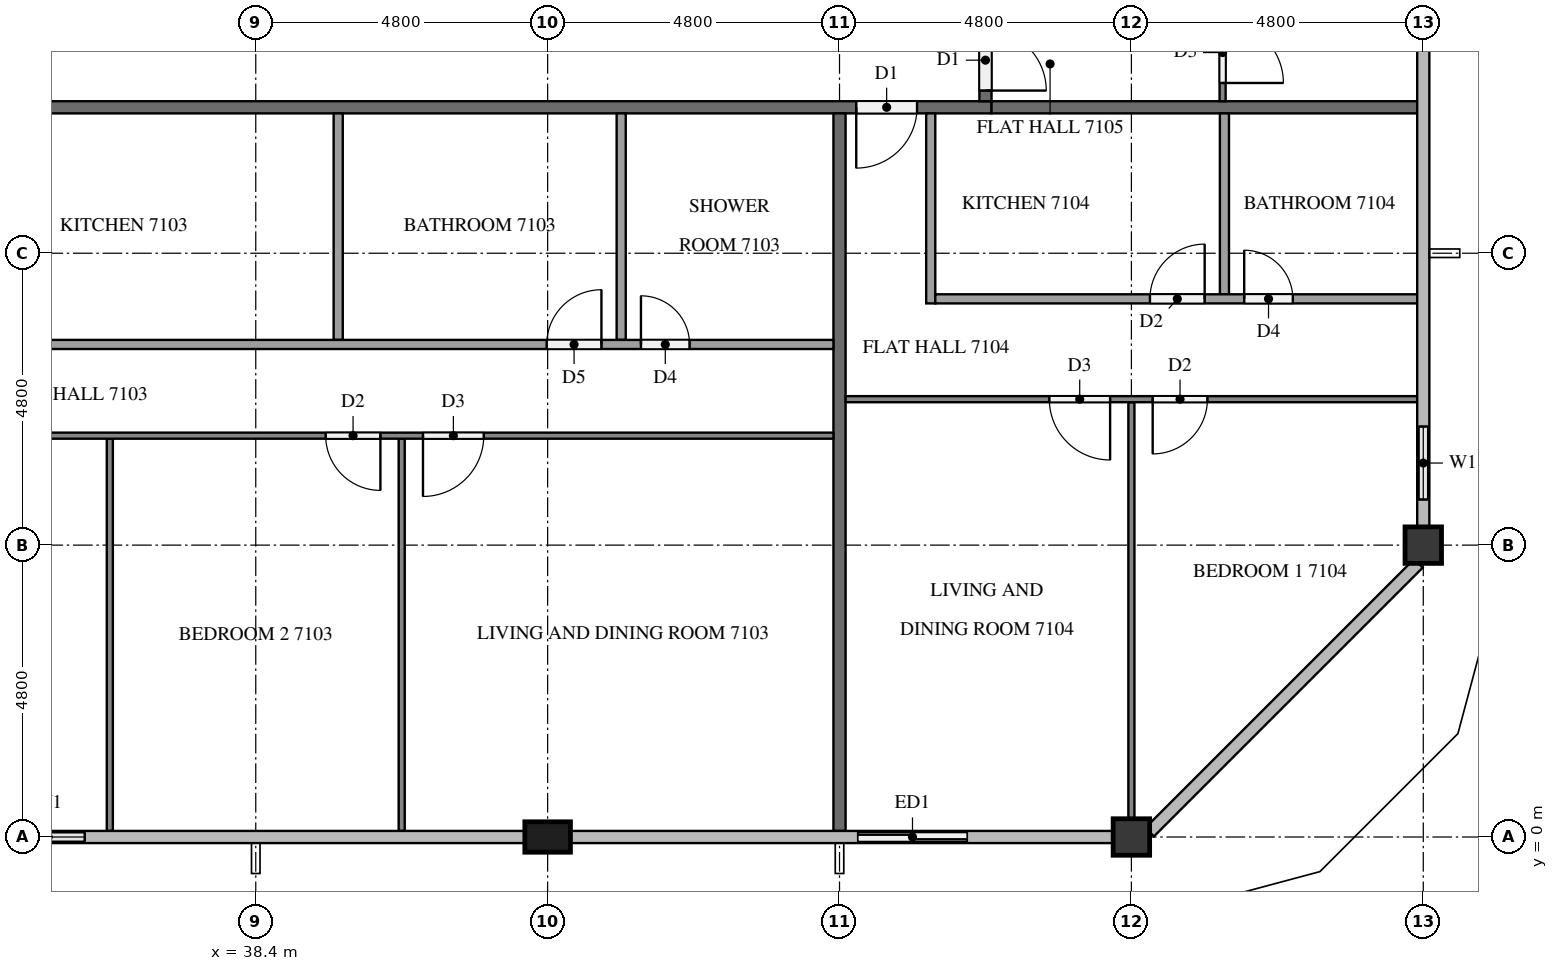
"""IFC4 building model, lengths in metres.
Left out: names, types, materials, properties, quantities, classifications, styles, units other than length and angle.
Written with IfcOpenShell. Run it as: python <this file> out.ifc"""

import sys

from ifc_helpers import new_model, si_unit, direction, frame, frame_2d, origin, origin_2d, place, context, subcontext, project, spatial, rectangle, extrude, element, fill, save


model = new_model("IFC4")
c1 = context("Model", 3, precision=1e-05, world=origin(), true_north=direction((0.0, 1.0)))
c2 = subcontext(c1, "Body", "Model", "MODEL_VIEW")
j1 = project(units=[si_unit("LENGTHUNIT", "METRE"), si_unit("PLANEANGLEUNIT", "RADIAN")], contexts=[c1])
p1 = place(None, origin())
s1 = spatial("IfcSite", under=j1, at=p1, CompositionType="ELEMENT")
p2 = place(p1, origin())
s2 = spatial("IfcBuilding", under=s1, at=p2, CompositionType="ELEMENT")
p3 = place(p2, frame((0.0, 0.0, 272.1)))
s3 = spatial("IfcBuildingStorey", under=s2, at=p3, CompositionType="ELEMENT", Elevation=272.1)
p4 = place(p3, frame((43.2, 0.0, 0.0), z_axis=(0.0, 0.0, 1.0), x_axis=(1.0, 0.0, 0.0)))
e1 = element("IfcColumn", 1, at=p4, inside=s3, PredefinedType="COLUMN", context=c2, shape_type="SweptSolid", body=[
    extrude(rectangle(XDim=0.75, YDim=0.5, at=origin_2d()), origin(), (0.0, 0.0, 1.0), 3.2),
])
for number, where, z_axis, x_axis in (
    (2, (52.8, 0.0, 0.0), (0.0, 0.0, 1.0), (1.0, 0.0, 0.0)),
    (3, (57.6, 4.8, 0.0), (0.0, 0.0, 1.0), (1.0, 0.0, 0.0)),
):
    element("IfcColumn", number, at=place(p3, frame(where, z_axis=z_axis, x_axis=x_axis)), inside=s3, PredefinedType="COLUMN", context=c2, shape_type="SweptSolid", body=[
        extrude(rectangle(XDim=0.6, YDim=0.6, at=origin_2d()), origin(), (0.0, 0.0, 1.0), 3.2),
    ])
p5 = place(p3, frame((33.975, 0.0, 0.0), z_axis=(0.0, 0.0, 1.0), x_axis=(1.0, 0.0, 0.0)))
e4 = element("IfcWall", 4, at=p5, inside=s3, PredefinedType="SOLIDWALL", context=c2, shape_type="SweptSolid", body=[
    extrude(rectangle(XDim=2.025, YDim=0.15, at=frame_2d((1.012, 0.0))), origin(), (0.0, 0.0, 1.0), 3.2),
])
p6 = place(p5, frame((0.413, 0.0, 0.9)))
e5 = element("IfcOpeningElement", 5, at=p6, cuts=e4, PredefinedType="OPENING", context=c2, shape_type="SweptSolid", body=[
    extrude(rectangle(XDim=1.2, YDim=1.4, at=frame_2d((0.6, 0.7))), frame((0.0, 0.085, 0.0), z_axis=(0.0, -1.0, 0.0), x_axis=(1.0, 0.0, 0.0)), (0.0, 0.0, 1.0), 0.17),
])
p7 = place(p3, frame((48.0, 0.0, 0.0), z_axis=(0.0, 0.0, 1.0), x_axis=(1.0, 0.0, 0.0)))
e6 = element("IfcWall", 6, at=p7, inside=s3, PredefinedType="SOLIDWALL", context=c2, shape_type="SweptSolid", body=[
    extrude(rectangle(XDim=2.4, YDim=0.15, at=frame_2d((1.2, 0.0))), origin(), (0.0, 0.0, 1.0), 3.2),
])
p8 = place(p7, frame((0.3, 0.0, 0.0)))
e7 = element("IfcOpeningElement", 7, at=p8, cuts=e6, PredefinedType="OPENING", context=c2, shape_type="SweptSolid", body=[
    extrude(rectangle(XDim=1.8, YDim=2.4, at=frame_2d((0.9, 1.2))), frame((0.0, 0.085, 0.0), z_axis=(0.0, -1.0, 0.0), x_axis=(1.0, 0.0, 0.0)), (0.0, 0.0, 1.0), 0.17),
])
p9 = place(p3, frame((57.6, 5.1, 0.0), z_axis=(0.0, 0.0, 1.0), x_axis=(0.0, 1.0, 0.0)))
e8 = element("IfcWall", 8, at=p9, inside=s3, PredefinedType="SOLIDWALL", context=c2, shape_type="SweptSolid", body=[
    extrude(rectangle(XDim=2.1, YDim=0.15, at=frame_2d((1.05, 0.0))), origin(), (0.0, 0.0, 1.0), 3.2),
])
p10 = place(p9, frame((0.45, 0.0, 0.9)))
e9 = element("IfcOpeningElement", 9, at=p10, cuts=e8, PredefinedType="OPENING", context=c2, shape_type="SweptSolid", body=[
    extrude(rectangle(XDim=1.2, YDim=1.4, at=frame_2d((0.6, 0.7))), frame((0.0, 0.085, 0.0), z_axis=(0.0, -1.0, 0.0), x_axis=(1.0, 0.0, 0.0)), (0.0, 0.0, 1.0), 0.17),
])
p11 = place(p3, frame((50.5, 12.0, 0.0), z_axis=(0.0, 0.0, 1.0), x_axis=(-1.0, 0.0, 0.0)))
e10 = element("IfcWall", 10, at=p11, inside=s3, PredefinedType="PARTITIONING", context=c2, shape_type="SweptSolid", body=[
    extrude(rectangle(XDim=38.6, YDim=0.2, at=frame_2d((19.3, 0.0))), origin(), (0.0, 0.0, 1.0), 3.2),
])
p12 = place(p11, frame((31.525, 0.0, 0.0)))
e11 = element("IfcOpeningElement", 11, at=p12, cuts=e10, PredefinedType="OPENING", context=c2, shape_type="SweptSolid", body=[
    extrude(rectangle(XDim=1.1, YDim=2.1, at=frame_2d((0.55, 1.05))), frame((0.0, 0.11, 0.0), z_axis=(0.0, -1.0, 0.0), x_axis=(1.0, 0.0, 0.0)), (0.0, 0.0, 1.0), 0.22),
])
p13 = place(p11, frame((19.575, 0.0, 0.0)))
e12 = element("IfcOpeningElement", 12, at=p13, cuts=e10, PredefinedType="OPENING", context=c2, shape_type="SweptSolid", body=[
    extrude(rectangle(XDim=1.0, YDim=2.1, at=frame_2d((0.5, 1.05))), frame((0.0, 0.11, 0.0), z_axis=(0.0, -1.0, 0.0), x_axis=(1.0, 0.0, 0.0)), (0.0, 0.0, 1.0), 0.22),
])
p14 = place(p11, frame((18.025, 0.0, 0.0)))
e13 = element("IfcOpeningElement", 13, at=p14, cuts=e10, PredefinedType="OPENING", context=c2, shape_type="SweptSolid", body=[
    extrude(rectangle(XDim=1.0, YDim=2.1, at=frame_2d((0.5, 1.05))), frame((0.0, 0.11, 0.0), z_axis=(0.0, -1.0, 0.0), x_axis=(1.0, 0.0, 0.0)), (0.0, 0.0, 1.0), 0.22),
])
p15 = place(p11, frame((1.225, 0.0, 0.0)))
e14 = element("IfcOpeningElement", 14, at=p15, cuts=e10, PredefinedType="OPENING", context=c2, shape_type="SweptSolid", body=[
    extrude(rectangle(XDim=1.0, YDim=2.1, at=frame_2d((0.5, 1.05))), frame((0.0, 0.11, 0.0), z_axis=(0.0, -1.0, 0.0), x_axis=(1.0, 0.0, 0.0)), (0.0, 0.0, 1.0), 0.22),
])
p16 = place(p3, frame((50.4, 40.7, 0.0), z_axis=(0.0, 0.0, 1.0), x_axis=(0.0, -1.0, 0.0)))
e15 = element("IfcWall", 15, at=p16, inside=s3, PredefinedType="PARTITIONING", context=c2, shape_type="SweptSolid", body=[
    extrude(rectangle(XDim=28.6, YDim=0.2, at=frame_2d((14.3, 0.0))), origin(), (0.0, 0.0, 1.0), 3.2),
])
p17 = place(p16, frame((27.425, 0.0, 0.0)))
e16 = element("IfcOpeningElement", 16, at=p17, cuts=e15, PredefinedType="OPENING", context=c2, shape_type="SweptSolid", body=[
    extrude(rectangle(XDim=1.0, YDim=2.1, at=frame_2d((0.5, 1.05))), frame((0.0, 0.11, 0.0), z_axis=(0.0, -1.0, 0.0), x_axis=(1.0, 0.0, 0.0)), (0.0, 0.0, 1.0), 0.22),
])
p18 = place(p16, frame((0.175, 0.0, 0.0)))
e17 = element("IfcOpeningElement", 17, at=p18, cuts=e15, PredefinedType="OPENING", context=c2, shape_type="SweptSolid", body=[
    extrude(rectangle(XDim=1.0, YDim=2.1, at=frame_2d((0.5, 1.05))), frame((0.0, 0.11, 0.0), z_axis=(0.0, -1.0, 0.0), x_axis=(1.0, 0.0, 0.0)), (0.0, 0.0, 1.0), 0.22),
])
p19 = place(p3, frame((48.0, 11.9, 0.0), z_axis=(0.0, 0.0, 1.0), x_axis=(0.0, -1.0, 0.0)))
e18 = element("IfcWall", 18, at=p19, inside=s3, PredefinedType="PARTITIONING", context=c2, shape_type="SweptSolid", body=[
    extrude(rectangle(XDim=11.8, YDim=0.2, at=frame_2d((5.9, 0.0))), origin(), (0.0, 0.0, 1.0), 3.2),
])
p20 = place(p3, frame((50.5, 12.0, 0.0), z_axis=(0.0, 0.0, 1.0), x_axis=(1.0, 0.0, 0.0)))
e19 = element("IfcWall", 19, at=p20, inside=s3, PredefinedType="PARTITIONING", context=c2, shape_type="SweptSolid", body=[
    extrude(rectangle(XDim=7.0, YDim=0.2, at=frame_2d((3.5, 0.0))), origin(), (0.0, 0.0, 1.0), 3.2),
])
for number, where, z_axis, x_axis in (
    (20, (36.0, 6.55, 0.0), (0.0, 0.0, 1.0), (0.0, -1.0, 0.0)),
    (21, (40.8, 6.55, 0.0), (0.0, 0.0, 1.0), (0.0, -1.0, 0.0)),
):
    element("IfcWall", number, at=place(p3, frame(where, z_axis=z_axis, x_axis=x_axis)), inside=s3, PredefinedType="PARTITIONING", context=c2, shape_type="SweptSolid", body=[
        extrude(rectangle(XDim=6.45, YDim=0.1, at=frame_2d((3.225, 0.0))), origin(), (0.0, 0.0, 1.0), 3.2),
    ])
p21 = place(p3, frame((47.9, 6.6, 0.0), z_axis=(0.0, 0.0, 1.0), x_axis=(-1.0, 0.0, 0.0)))
e22 = element("IfcWall", 22, at=p21, inside=s3, PredefinedType="PARTITIONING", context=c2, shape_type="SweptSolid", body=[
    extrude(rectangle(XDim=16.6, YDim=0.1, at=frame_2d((8.3, 0.0))), origin(), (0.0, 0.0, 1.0), 3.2),
])
p22 = place(p21, frame((15.4, 0.0, 0.0)))
e23 = element("IfcOpeningElement", 23, at=p22, cuts=e22, PredefinedType="OPENING", context=c2, shape_type="SweptSolid", body=[
    extrude(rectangle(XDim=0.9, YDim=2.1, at=frame_2d((0.45, 1.05))), frame((0.0, 0.06, 0.0), z_axis=(0.0, -1.0, 0.0), x_axis=(1.0, 0.0, 0.0)), (0.0, 0.0, 1.0), 0.12),
])
p23 = place(p21, frame((7.45, 0.0, 0.0)))
e24 = element("IfcOpeningElement", 24, at=p23, cuts=e22, PredefinedType="OPENING", context=c2, shape_type="SweptSolid", body=[
    extrude(rectangle(XDim=0.9, YDim=2.1, at=frame_2d((0.45, 1.05))), frame((0.0, 0.06, 0.0), z_axis=(0.0, -1.0, 0.0), x_axis=(1.0, 0.0, 0.0)), (0.0, 0.0, 1.0), 0.12),
])
p24 = place(p21, frame((5.75, 0.0, 0.0)))
e25 = element("IfcOpeningElement", 25, at=p24, cuts=e22, PredefinedType="OPENING", context=c2, shape_type="SweptSolid", body=[
    extrude(rectangle(XDim=1.0, YDim=2.1, at=frame_2d((0.5, 1.05))), frame((0.0, 0.06, 0.0), z_axis=(0.0, -1.0, 0.0), x_axis=(1.0, 0.0, 0.0)), (0.0, 0.0, 1.0), 0.12),
])
for number, where, z_axis, x_axis in (
    (26, (39.756, 11.9, 0.0), (0.0, 0.0, 1.0), (0.0, -1.0, 0.0)),
    (27, (44.41, 11.9, 0.0), (0.0, 0.0, 1.0), (0.0, -1.0, 0.0)),
):
    element("IfcWall", number, at=place(p3, frame(where, z_axis=z_axis, x_axis=x_axis)), inside=s3, PredefinedType="PARTITIONING", context=c2, shape_type="SweptSolid", body=[
        extrude(rectangle(XDim=3.725, YDim=0.15, at=frame_2d((1.862, 0.0))), origin(), (0.0, 0.0, 1.0), 3.2),
    ])
p25 = place(p3, frame((32.775, 8.1, 0.0), z_axis=(0.0, 0.0, 1.0), x_axis=(1.0, 0.0, 0.0)))
e28 = element("IfcWall", 28, at=p25, inside=s3, PredefinedType="PARTITIONING", context=c2, shape_type="SweptSolid", body=[
    extrude(rectangle(XDim=15.125, YDim=0.15, at=frame_2d((7.562, 0.0))), origin(), (0.0, 0.0, 1.0), 3.2),
])
p26 = place(p25, frame((0.3, 0.0, 0.0)))
e29 = element("IfcOpeningElement", 29, at=p26, cuts=e28, PredefinedType="OPENING", context=c2, shape_type="SweptSolid", body=[
    extrude(rectangle(XDim=0.9, YDim=2.1, at=frame_2d((0.45, 1.05))), frame((0.0, 0.085, 0.0), z_axis=(0.0, -1.0, 0.0), x_axis=(1.0, 0.0, 0.0)), (0.0, 0.0, 1.0), 0.17),
])
p27 = place(p25, frame((10.41, 0.0, 0.0)))
e30 = element("IfcOpeningElement", 30, at=p27, cuts=e28, PredefinedType="OPENING", context=c2, shape_type="SweptSolid", body=[
    extrude(rectangle(XDim=0.9, YDim=2.1, at=frame_2d((0.45, 1.05))), frame((0.0, 0.085, 0.0), z_axis=(0.0, -1.0, 0.0), x_axis=(1.0, 0.0, 0.0)), (0.0, 0.0, 1.0), 0.17),
])
p28 = place(p25, frame((11.96, 0.0, 0.0)))
e31 = element("IfcOpeningElement", 31, at=p28, cuts=e28, PredefinedType="OPENING", context=c2, shape_type="SweptSolid", body=[
    extrude(rectangle(XDim=0.8, YDim=2.1, at=frame_2d((0.4, 1.05))), frame((0.0, 0.085, 0.0), z_axis=(0.0, -1.0, 0.0), x_axis=(1.0, 0.0, 0.0)), (0.0, 0.0, 1.0), 0.17),
])
p29 = place(p3, frame((52.8, 7.15, 0.0), z_axis=(0.0, 0.0, 1.0), x_axis=(0.0, -1.0, 0.0)))
e32 = element("IfcWall", 32, at=p29, inside=s3, PredefinedType="PARTITIONING", context=c2, shape_type="SweptSolid", body=[
    extrude(rectangle(XDim=6.85, YDim=0.1, at=frame_2d((3.425, 0.0))), origin(), (0.0, 0.0, 1.0), 3.2),
])
p30 = place(p3, frame((57.5, 7.2, 0.0), z_axis=(0.0, 0.0, 1.0), x_axis=(-1.0, 0.0, 0.0)))
e33 = element("IfcWall", 33, at=p30, inside=s3, PredefinedType="PARTITIONING", context=c2, shape_type="SweptSolid", body=[
    extrude(rectangle(XDim=9.4, YDim=0.1, at=frame_2d((4.7, 0.0))), origin(), (0.0, 0.0, 1.0), 3.2),
])
p31 = place(p30, frame((5.05, 0.0, 0.0)))
e34 = element("IfcOpeningElement", 34, at=p31, cuts=e33, PredefinedType="OPENING", context=c2, shape_type="SweptSolid", body=[
    extrude(rectangle(XDim=1.0, YDim=2.1, at=frame_2d((0.5, 1.05))), frame((0.0, 0.06, 0.0), z_axis=(0.0, -1.0, 0.0), x_axis=(1.0, 0.0, 0.0)), (0.0, 0.0, 1.0), 0.12),
])
p32 = place(p30, frame((3.45, 0.0, 0.0)))
e35 = element("IfcOpeningElement", 35, at=p32, cuts=e33, PredefinedType="OPENING", context=c2, shape_type="SweptSolid", body=[
    extrude(rectangle(XDim=0.9, YDim=2.1, at=frame_2d((0.45, 1.05))), frame((0.0, 0.06, 0.0), z_axis=(0.0, -1.0, 0.0), x_axis=(1.0, 0.0, 0.0)), (0.0, 0.0, 1.0), 0.12),
])
p33 = place(p3, frame((54.33, 11.9, 0.0), z_axis=(0.0, 0.0, 1.0), x_axis=(0.0, -1.0, 0.0)))
e36 = element("IfcWall", 36, at=p33, inside=s3, PredefinedType="PARTITIONING", context=c2, shape_type="SweptSolid", body=[
    extrude(rectangle(XDim=2.975, YDim=0.15, at=frame_2d((1.487, 0.0))), origin(), (0.0, 0.0, 1.0), 3.2),
])
p34 = place(p3, frame((49.5, 11.9, 0.0), z_axis=(0.0, 0.0, 1.0), x_axis=(0.0, -1.0, 0.0)))
e37 = element("IfcWall", 37, at=p34, inside=s3, PredefinedType="PARTITIONING", context=c2, shape_type="SweptSolid", body=[
    extrude(rectangle(XDim=3.125, YDim=0.15, at=frame_2d((1.562, 0.0))), origin(), (0.0, 0.0, 1.0), 3.2),
])
p35 = place(p3, frame((49.575, 8.85, 0.0), z_axis=(0.0, 0.0, 1.0), x_axis=(1.0, 0.0, 0.0)))
e38 = element("IfcWall", 38, at=p35, inside=s3, PredefinedType="PARTITIONING", context=c2, shape_type="SweptSolid", body=[
    extrude(rectangle(XDim=7.925, YDim=0.15, at=frame_2d((3.962, 0.0))), origin(), (0.0, 0.0, 1.0), 3.2),
])
p36 = place(p35, frame((3.53, 0.0, 0.0)))
e39 = element("IfcOpeningElement", 39, at=p36, cuts=e38, PredefinedType="OPENING", context=c2, shape_type="SweptSolid", body=[
    extrude(rectangle(XDim=0.9, YDim=2.1, at=frame_2d((0.45, 1.05))), frame((0.0, 0.085, 0.0), z_axis=(0.0, -1.0, 0.0), x_axis=(1.0, 0.0, 0.0)), (0.0, 0.0, 1.0), 0.17),
])
p37 = place(p35, frame((5.08, 0.0, 0.0)))
e40 = element("IfcOpeningElement", 40, at=p37, cuts=e38, PredefinedType="OPENING", context=c2, shape_type="SweptSolid", body=[
    extrude(rectangle(XDim=0.8, YDim=2.1, at=frame_2d((0.4, 1.05))), frame((0.0, 0.085, 0.0), z_axis=(0.0, -1.0, 0.0), x_axis=(1.0, 0.0, 0.0)), (0.0, 0.0, 1.0), 0.17),
])
p38 = place(p3, frame((54.3, 28.7, 0.0), z_axis=(0.0, 0.0, 1.0), x_axis=(0.0, -1.0, 0.0)))
e41 = element("IfcWall", 41, at=p38, inside=s3, PredefinedType="PARTITIONING", context=c2, shape_type="SweptSolid", body=[
    extrude(rectangle(XDim=16.6, YDim=0.1, at=frame_2d((8.3, 0.0))), origin(), (0.0, 0.0, 1.0), 3.2),
])
p39 = place(p38, frame((15.3, 0.0, 0.0)))
e42 = element("IfcOpeningElement", 42, at=p39, cuts=e41, PredefinedType="OPENING", context=c2, shape_type="SweptSolid", body=[
    extrude(rectangle(XDim=1.0, YDim=2.1, at=frame_2d((0.5, 1.05))), frame((0.0, 0.06, 0.0), z_axis=(0.0, -1.0, 0.0), x_axis=(1.0, 0.0, 0.0)), (0.0, 0.0, 1.0), 0.12),
])
p40 = place(p38, frame((5.05, 0.0, 0.0)))
e43 = element("IfcOpeningElement", 43, at=p40, cuts=e41, PredefinedType="OPENING", context=c2, shape_type="SweptSolid", body=[
    extrude(rectangle(XDim=0.9, YDim=2.1, at=frame_2d((0.45, 1.05))), frame((0.0, 0.06, 0.0), z_axis=(0.0, -1.0, 0.0), x_axis=(1.0, 0.0, 0.0)), (0.0, 0.0, 1.0), 0.12),
])
p41 = place(p38, frame((3.45, 0.0, 0.0)))
e44 = element("IfcOpeningElement", 44, at=p41, cuts=e41, PredefinedType="OPENING", context=c2, shape_type="SweptSolid", body=[
    extrude(rectangle(XDim=0.9, YDim=2.1, at=frame_2d((0.45, 1.05))), frame((0.0, 0.06, 0.0), z_axis=(0.0, -1.0, 0.0), x_axis=(1.0, 0.0, 0.0)), (0.0, 0.0, 1.0), 0.12),
])
p42 = place(p6, origin())
e45 = element("IfcWindow", 45, at=p42, inside=s3, PartitioningType="SINGLE_PANEL", PredefinedType="WINDOW", context=c2, shape_type="SweptSolid", body=[
    extrude(rectangle(XDim=1.2, YDim=1.4, at=frame_2d((0.6, 0.7))), frame((0.0, 0.03, 0.0), z_axis=(0.0, -1.0, 0.0), x_axis=(1.0, 0.0, 0.0)), (0.0, 0.0, 1.0), 0.06),
])
fill(e5, e45)
p43 = place(p8, origin())
e46 = element("IfcDoor", 46, at=p43, inside=s3, OperationType="SLIDING_TO_RIGHT", PredefinedType="DOOR", context=c2, shape_type="SweptSolid", body=[
    extrude(rectangle(XDim=1.8, YDim=2.4, at=frame_2d((0.9, 1.2))), frame((0.0, 0.025, 0.0), z_axis=(0.0, -1.0, 0.0), x_axis=(1.0, 0.0, 0.0)), (0.0, 0.0, 1.0), 0.05),
])
fill(e7, e46)
p44 = place(p10, origin())
e47 = element("IfcWindow", 47, at=p44, inside=s3, PartitioningType="SINGLE_PANEL", PredefinedType="WINDOW", context=c2, shape_type="SweptSolid", body=[
    extrude(rectangle(XDim=1.2, YDim=1.4, at=frame_2d((0.6, 0.7))), frame((0.0, 0.03, 0.0), z_axis=(0.0, -1.0, 0.0), x_axis=(1.0, 0.0, 0.0)), (0.0, 0.0, 1.0), 0.06),
])
fill(e9, e47)
p45 = place(p15, origin())
e48 = element("IfcDoor", 48, at=p45, inside=s3, OperationType="SINGLE_SWING_RIGHT", PredefinedType="DOOR", context=c2, shape_type="SweptSolid", body=[
    extrude(rectangle(XDim=1.0, YDim=2.1, at=frame_2d((0.5, 1.05))), frame((0.0, 0.025, 0.0), z_axis=(0.0, -1.0, 0.0), x_axis=(1.0, 0.0, 0.0)), (0.0, 0.0, 1.0), 0.05),
])
fill(e14, e48)
p46 = place(p17, origin())
e49 = element("IfcDoor", 49, at=p46, inside=s3, OperationType="SINGLE_SWING_RIGHT", PredefinedType="DOOR", context=c2, shape_type="SweptSolid", body=[
    extrude(rectangle(XDim=1.0, YDim=2.1, at=frame_2d((0.5, 1.05))), frame((0.0, 0.025, 0.0), z_axis=(0.0, -1.0, 0.0), x_axis=(1.0, 0.0, 0.0)), (0.0, 0.0, 1.0), 0.05),
])
fill(e16, e49)
p47 = place(p23, origin())
e50 = element("IfcDoor", 50, at=p47, inside=s3, OperationType="SINGLE_SWING_LEFT", PredefinedType="DOOR", context=c2, shape_type="SweptSolid", body=[
    extrude(rectangle(XDim=0.9, YDim=2.1, at=frame_2d((0.45, 1.05))), frame((0.0, 0.025, 0.0), z_axis=(0.0, -1.0, 0.0), x_axis=(1.0, 0.0, 0.0)), (0.0, 0.0, 1.0), 0.05),
])
fill(e24, e50)
p48 = place(p24, origin())
e51 = element("IfcDoor", 51, at=p48, inside=s3, OperationType="SINGLE_SWING_RIGHT", PredefinedType="DOOR", context=c2, shape_type="SweptSolid", body=[
    extrude(rectangle(XDim=1.0, YDim=2.1, at=frame_2d((0.5, 1.05))), frame((0.0, 0.025, 0.0), z_axis=(0.0, -1.0, 0.0), x_axis=(1.0, 0.0, 0.0)), (0.0, 0.0, 1.0), 0.05),
])
fill(e25, e51)
p49 = place(p27, origin())
e52 = element("IfcDoor", 52, at=p49, inside=s3, OperationType="SINGLE_SWING_RIGHT", PredefinedType="DOOR", context=c2, shape_type="SweptSolid", body=[
    extrude(rectangle(XDim=0.9, YDim=2.1, at=frame_2d((0.45, 1.05))), frame((0.0, 0.025, 0.0), z_axis=(0.0, -1.0, 0.0), x_axis=(1.0, 0.0, 0.0)), (0.0, 0.0, 1.0), 0.05),
])
fill(e30, e52)
p50 = place(p28, origin())
e53 = element("IfcDoor", 53, at=p50, inside=s3, OperationType="SINGLE_SWING_LEFT", PredefinedType="DOOR", context=c2, shape_type="SweptSolid", body=[
    extrude(rectangle(XDim=0.8, YDim=2.1, at=frame_2d((0.4, 1.05))), frame((0.0, 0.025, 0.0), z_axis=(0.0, -1.0, 0.0), x_axis=(1.0, 0.0, 0.0)), (0.0, 0.0, 1.0), 0.05),
])
fill(e31, e53)
p51 = place(p31, origin())
e54 = element("IfcDoor", 54, at=p51, inside=s3, OperationType="SINGLE_SWING_LEFT", PredefinedType="DOOR", context=c2, shape_type="SweptSolid", body=[
    extrude(rectangle(XDim=1.0, YDim=2.1, at=frame_2d((0.5, 1.05))), frame((0.0, 0.025, 0.0), z_axis=(0.0, -1.0, 0.0), x_axis=(1.0, 0.0, 0.0)), (0.0, 0.0, 1.0), 0.05),
])
fill(e34, e54)
p52 = place(p32, origin())
e55 = element("IfcDoor", 55, at=p52, inside=s3, OperationType="SINGLE_SWING_RIGHT", PredefinedType="DOOR", context=c2, shape_type="SweptSolid", body=[
    extrude(rectangle(XDim=0.9, YDim=2.1, at=frame_2d((0.45, 1.05))), frame((0.0, 0.025, 0.0), z_axis=(0.0, -1.0, 0.0), x_axis=(1.0, 0.0, 0.0)), (0.0, 0.0, 1.0), 0.05),
])
fill(e35, e55)
p53 = place(p36, origin())
e56 = element("IfcDoor", 56, at=p53, inside=s3, OperationType="SINGLE_SWING_RIGHT", PredefinedType="DOOR", context=c2, shape_type="SweptSolid", body=[
    extrude(rectangle(XDim=0.9, YDim=2.1, at=frame_2d((0.45, 1.05))), frame((0.0, 0.025, 0.0), z_axis=(0.0, -1.0, 0.0), x_axis=(1.0, 0.0, 0.0)), (0.0, 0.0, 1.0), 0.05),
])
fill(e39, e56)
p54 = place(p37, origin())
e57 = element("IfcDoor", 57, at=p54, inside=s3, OperationType="SINGLE_SWING_LEFT", PredefinedType="DOOR", context=c2, shape_type="SweptSolid", body=[
    extrude(rectangle(XDim=0.8, YDim=2.1, at=frame_2d((0.4, 1.05))), frame((0.0, 0.025, 0.0), z_axis=(0.0, -1.0, 0.0), x_axis=(1.0, 0.0, 0.0)), (0.0, 0.0, 1.0), 0.05),
])
fill(e40, e57)
p55 = place(p39, origin())
e58 = element("IfcDoor", 58, at=p55, inside=s3, OperationType="SINGLE_SWING_RIGHT", PredefinedType="DOOR", context=c2, shape_type="SweptSolid", body=[
    extrude(rectangle(XDim=1.0, YDim=2.1, at=frame_2d((0.5, 1.05))), frame((0.0, 0.025, 0.0), z_axis=(0.0, -1.0, 0.0), x_axis=(1.0, 0.0, 0.0)), (0.0, 0.0, 1.0), 0.05),
])
fill(e42, e58)
save(model, sys.argv[1])
